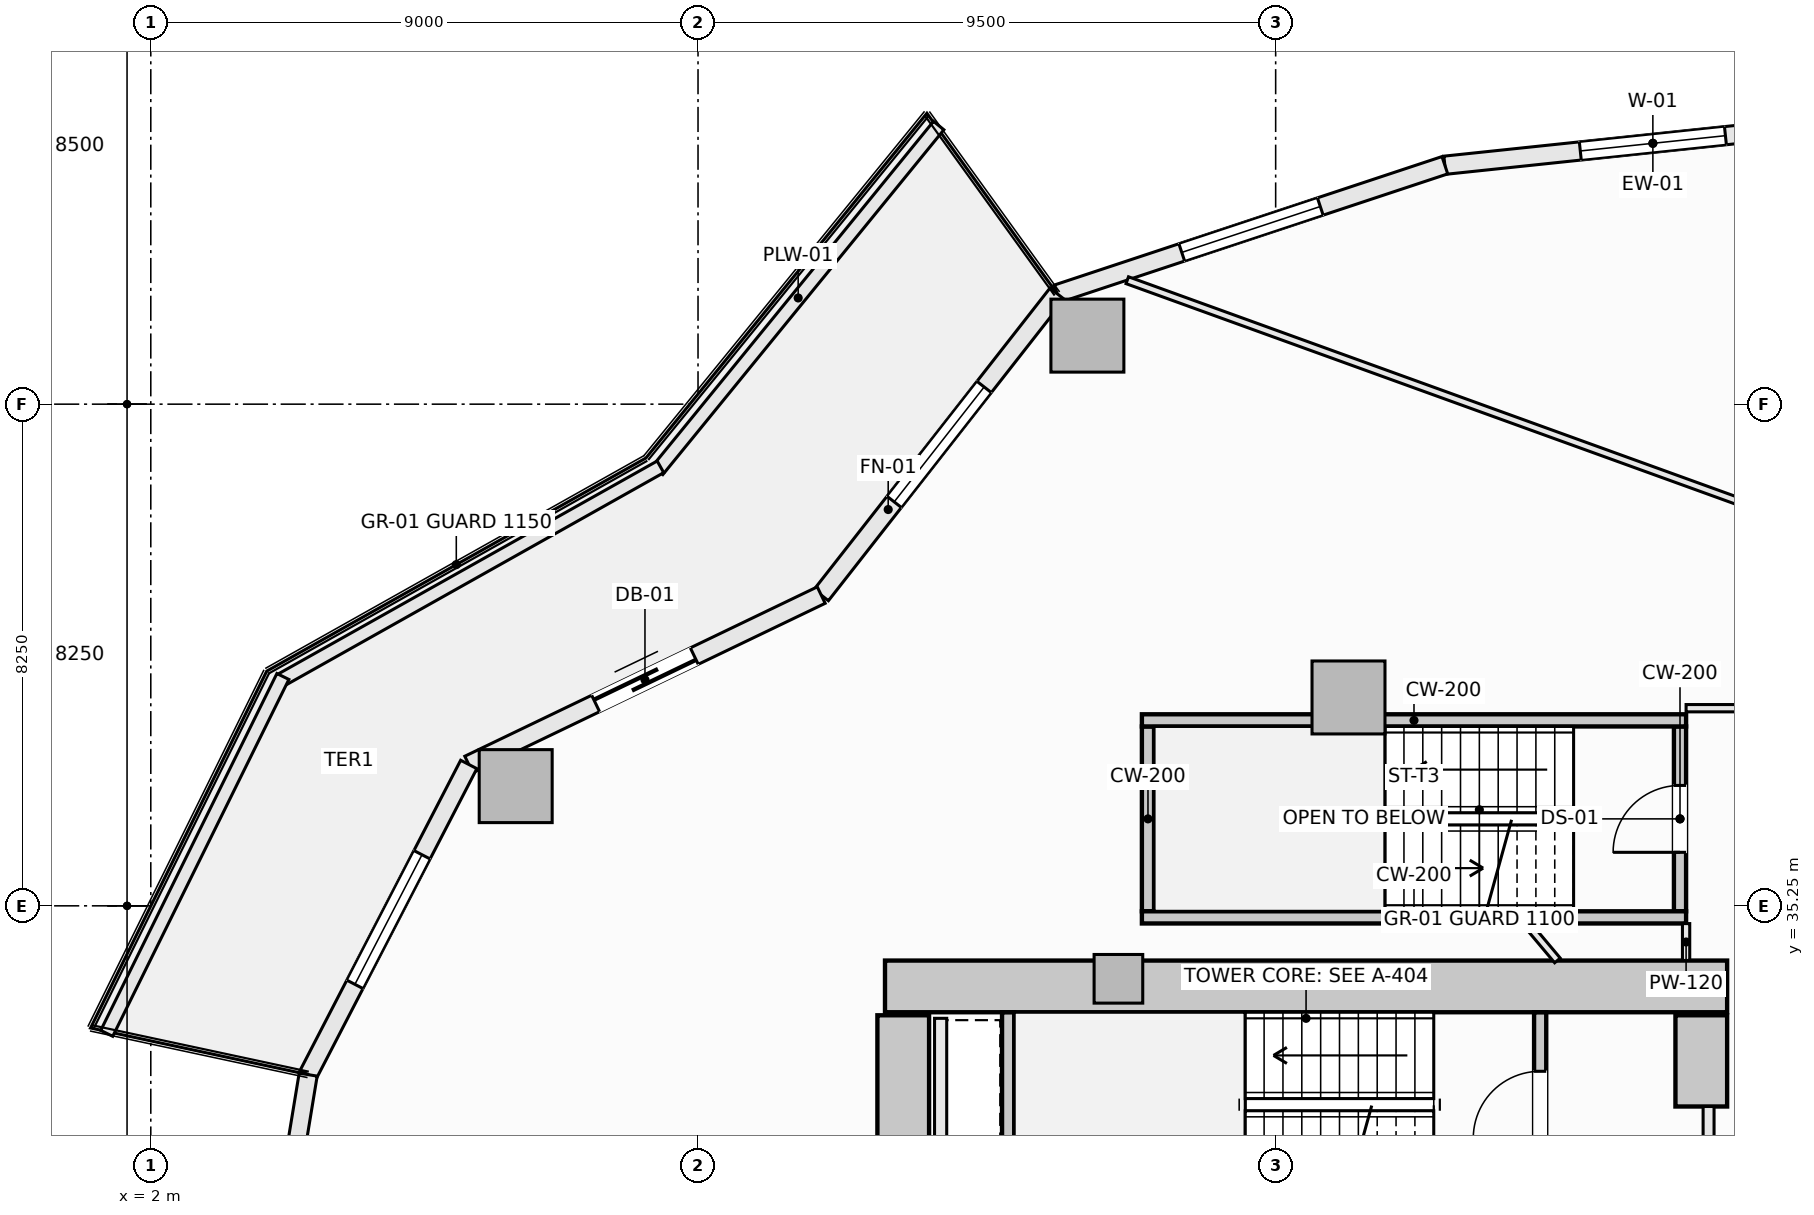
"""IFC4 building model, lengths in metres.
Left out: names, types, materials, properties, quantities, classifications, styles, units other than length and angle.
Written with IfcOpenShell. Run it as: python <this file> out.ifc"""

import sys

from ifc_helpers import new_model, si_unit, direction, frame, frame_2d, origin, origin_2d, place, context, subcontext, project, spatial, rectangle, extrude, element, fill, save


model = new_model("IFC4")
c1 = context("Model", 3, precision=1e-05, world=origin(), true_north=direction((0.0, 1.0)))
c2 = subcontext(c1, "Body", "Model", "MODEL_VIEW")
j1 = project(units=[si_unit("LENGTHUNIT", "METRE"), si_unit("PLANEANGLEUNIT", "RADIAN")], contexts=[c1])
p1 = place(None, origin())
s1 = spatial("IfcSite", under=j1, at=p1, CompositionType="ELEMENT")
p2 = place(p1, origin())
s2 = spatial("IfcBuilding", under=s1, at=p2, CompositionType="ELEMENT")
p3 = place(p2, frame((0.0, 0.0, 80.4)))
s3 = spatial("IfcBuildingStorey", under=s2, at=p3, CompositionType="ELEMENT", Elevation=80.4)
p4 = place(p3, frame((14.075, 33.925, -0.28), z_axis=(0.0, 0.0, 1.0), x_axis=(1.0, 0.0, 0.0)))
e1 = element("IfcWall", 1, at=p4, inside=s3, PredefinedType="SHEAR", context=c2, shape_type="SweptSolid", body=[
    extrude(rectangle(XDim=13.85, YDim=0.85, at=frame_2d((6.925, 0.0))), origin(), (0.0, 0.0, 1.0), 3.85),
])
p5 = place(p3, frame((14.375, 20.55, -0.28), z_axis=(0.0, 0.0, 1.0), x_axis=(0.0, 1.0, 0.0)))
e2 = element("IfcWall", 2, at=p5, inside=s3, PredefinedType="SHEAR", context=c2, shape_type="SweptSolid", body=[
    extrude(rectangle(XDim=12.9, YDim=0.85, at=frame_2d((6.45, 0.0))), origin(), (0.0, 0.0, 1.0), 3.85),
])
p6 = place(p3, frame((27.5, 31.95, -0.28), z_axis=(0.0, 0.0, 1.0), x_axis=(0.0, 1.0, 0.0)))
e3 = element("IfcWall", 3, at=p6, inside=s3, PredefinedType="SHEAR", context=c2, shape_type="SweptSolid", body=[
    extrude(rectangle(XDim=1.5, YDim=0.85, at=frame_2d((0.75, 0.0))), origin(), (0.0, 0.0, 1.0), 3.85),
])
for number, where, z_axis, x_axis in (
    (4, (17.404, 44.627, -0.28), (0.0, 0.0, 1.0), (1.0, 0.0, 0.0)),
    (5, (8.001, 37.219, -0.28), (0.0, 0.0, 1.0), (1.0, 0.0, 0.0)),
    (6, (21.698, 38.677, -0.28), (0.0, 0.0, 1.0), (1.0, 0.0, 0.0)),
):
    element("IfcColumn", number, at=place(p3, frame(where, z_axis=z_axis, x_axis=x_axis)), inside=s3, PredefinedType="COLUMN", context=c2, shape_type="SweptSolid", body=[
        extrude(rectangle(XDim=1.2, YDim=1.2, at=origin_2d()), origin(), (0.0, 0.0, 1.0), 3.85),
    ])
p7 = place(p3, frame((17.914, 34.05, -0.28), z_axis=(0.0, 0.0, 1.0), x_axis=(1.0, 0.0, 0.0)))
e7 = element("IfcColumn", 7, at=p7, inside=s3, PredefinedType="PILASTER", context=c2, shape_type="SweptSolid", body=[
    extrude(rectangle(XDim=0.8, YDim=0.8, at=origin_2d()), origin(), (0.0, 0.0, 1.0), 3.85),
])
p8 = place(p3, frame((23.282, 47.429, 0.0), z_axis=(0.0, 0.0, 1.0), x_axis=(0.994498840295, 0.104747585419, 0.0)))
e8 = element("IfcWall", 8, at=p8, inside=s3, PredefinedType="SOLIDWALL", context=c2, shape_type="SweptSolid", body=[
    extrude(rectangle(XDim=6.88, YDim=0.3, at=frame_2d((3.44, 0.0))), origin(), (0.0, 0.0, 1.0), 3.093),
])
p9 = place(p8, frame((2.24, 0.0, 0.85)))
e9 = element("IfcOpeningElement", 9, at=p9, cuts=e8, PredefinedType="OPENING", context=c2, shape_type="SweptSolid", body=[
    extrude(rectangle(XDim=2.4, YDim=1.9, at=frame_2d((1.2, 0.95))), frame((0.0, 0.16, 0.0), z_axis=(0.0, -1.0, 0.0), x_axis=(1.0, 0.0, 0.0)), (0.0, 0.0, 1.0), 0.32),
])
p10 = place(p3, frame((16.906, 45.316, 0.0), z_axis=(0.0, 0.0, 1.0), x_axis=(0.949245153629, 0.314537181127, 0.0)))
e10 = element("IfcWall", 10, at=p10, inside=s3, PredefinedType="SOLIDWALL", context=c2, shape_type="SweptSolid", body=[
    extrude(rectangle(XDim=6.717, YDim=0.3, at=frame_2d((3.358, 0.0))), origin(), (0.0, 0.0, 1.0), 3.093),
])
p11 = place(p10, frame((2.159, 0.0, 0.85)))
e11 = element("IfcOpeningElement", 11, at=p11, cuts=e10, PredefinedType="OPENING", context=c2, shape_type="SweptSolid", body=[
    extrude(rectangle(XDim=2.4, YDim=1.9, at=frame_2d((1.2, 0.95))), frame((0.0, 0.16, 0.0), z_axis=(0.0, -1.0, 0.0), x_axis=(1.0, 0.0, 0.0)), (0.0, 0.0, 1.0), 0.32),
])
p12 = place(p3, frame((13.026, 40.36, 0.0), z_axis=(0.0, 0.0, 1.0), x_axis=(0.616434798832, 0.78740595552, 0.0)))
e12 = element("IfcWall", 12, at=p12, inside=s3, PredefinedType="SOLIDWALL", context=c2, shape_type="SweptSolid", body=[
    extrude(rectangle(XDim=6.294, YDim=0.3, at=frame_2d((3.147, 0.0))), origin(), (0.0, 0.0, 1.0), 3.093),
])
p13 = place(p12, frame((1.947, 0.0, 0.85)))
e13 = element("IfcOpeningElement", 13, at=p13, cuts=e12, PredefinedType="OPENING", context=c2, shape_type="SweptSolid", body=[
    extrude(rectangle(XDim=2.4, YDim=1.9, at=frame_2d((1.2, 0.95))), frame((0.0, 0.16, 0.0), z_axis=(0.0, -1.0, 0.0), x_axis=(1.0, 0.0, 0.0)), (0.0, 0.0, 1.0), 0.32),
])
p14 = place(p3, frame((7.229, 37.575, 0.0), z_axis=(0.0, 0.0, 1.0), x_axis=(0.901354747727, 0.433081538224, 0.0)))
e14 = element("IfcWall", 14, at=p14, inside=s3, PredefinedType="SOLIDWALL", context=c2, shape_type="SweptSolid", body=[
    extrude(rectangle(XDim=6.431, YDim=0.3, at=frame_2d((3.215, 0.0))), origin(), (0.0, 0.0, 1.0), 3.093),
])
p15 = place(p14, frame((2.315, 0.0, 0.0)))
e15 = element("IfcOpeningElement", 15, at=p15, cuts=e14, PredefinedType="OPENING", context=c2, shape_type="SweptSolid", body=[
    extrude(rectangle(XDim=1.8, YDim=2.25, at=frame_2d((0.9, 1.125))), frame((0.0, 0.16, 0.0), z_axis=(0.0, -1.0, 0.0), x_axis=(1.0, 0.0, 0.0)), (0.0, 0.0, 1.0), 0.32),
])
p16 = place(p3, frame((4.588, 32.474, 0.0), z_axis=(0.0, 0.0, 1.0), x_axis=(0.459800981414, 0.888021991558, 0.0)))
e16 = element("IfcWall", 16, at=p16, inside=s3, PredefinedType="SOLIDWALL", context=c2, shape_type="SweptSolid", body=[
    extrude(rectangle(XDim=5.744, YDim=0.3, at=frame_2d((2.872, 0.0))), origin(), (0.0, 0.0, 1.0), 3.093),
])
p17 = place(p16, frame((1.672, 0.0, 0.85)))
e17 = element("IfcOpeningElement", 17, at=p17, cuts=e16, PredefinedType="OPENING", context=c2, shape_type="SweptSolid", body=[
    extrude(rectangle(XDim=2.4, YDim=1.9, at=frame_2d((1.2, 0.95))), frame((0.0, 0.16, 0.0), z_axis=(0.0, -1.0, 0.0), x_axis=(1.0, 0.0, 0.0)), (0.0, 0.0, 1.0), 0.32),
])
p18 = place(p3, frame((3.688, 27.0, 0.0), z_axis=(0.0, 0.0, 1.0), x_axis=(0.162386212206, 0.986727276447, 0.0)))
e18 = element("IfcWall", 18, at=p18, inside=s3, PredefinedType="SOLIDWALL", context=c2, shape_type="SweptSolid", body=[
    extrude(rectangle(XDim=5.548, YDim=0.3, at=frame_2d((2.774, 0.0))), origin(), (0.0, 0.0, 1.0), 3.093),
])
p19 = place(p18, frame((1.574, 0.0, 0.85)))
e19 = element("IfcOpeningElement", 19, at=p19, cuts=e18, PredefinedType="OPENING", context=c2, shape_type="SweptSolid", body=[
    extrude(rectangle(XDim=2.4, YDim=1.9, at=frame_2d((1.2, 0.95))), frame((0.0, 0.16, 0.0), z_axis=(0.0, -1.0, 0.0), x_axis=(1.0, 0.0, 0.0)), (0.0, 0.0, 1.0), 0.32),
])
p20 = place(p3, frame((10.336, 42.411, 0.0), z_axis=(0.0, 0.0, 1.0), x_axis=(0.631819273026, 0.775115737315, 0.0)))
e20 = element("IfcWall", 20, at=p20, inside=s3, PredefinedType="PARAPET", context=c2, shape_type="SweptSolid", body=[
    extrude(rectangle(XDim=7.316, YDim=0.22, at=frame_2d((3.658, 0.0))), origin(), (0.0, 0.0, 1.0), 0.52),
])
p21 = place(p3, frame((4.147, 38.966, 0.0), z_axis=(0.0, 0.0, 1.0), x_axis=(0.871775109335, 0.489906275468, 0.0)))
e21 = element("IfcWall", 21, at=p21, inside=s3, PredefinedType="PARAPET", context=c2, shape_type="SweptSolid", body=[
    extrude(rectangle(XDim=7.152, YDim=0.22, at=frame_2d((3.576, 0.0))), origin(), (0.0, 0.0, 1.0), 0.52),
])
p22 = place(p3, frame((1.275, 33.153, 0.0), z_axis=(0.0, 0.0, 1.0), x_axis=(0.442686636348, 0.89667638644, 0.0)))
e22 = element("IfcWall", 22, at=p22, inside=s3, PredefinedType="PARAPET", context=c2, shape_type="SweptSolid", body=[
    extrude(rectangle(XDim=6.545, YDim=0.22, at=frame_2d((3.272, 0.0))), origin(), (0.0, 0.0, 1.0), 0.52),
])
p23 = place(p3, frame((24.85, 30.46, -0.28), z_axis=(0.0, 0.0, 1.0), x_axis=(0.0, 1.0, 0.0)))
e23 = element("IfcWall", 23, at=p23, inside=s3, PredefinedType="SHEAR", context=c2, shape_type="SweptSolid", body=[
    extrude(rectangle(XDim=3.038, YDim=0.2, at=frame_2d((1.519, 0.0))), origin(), (0.0, 0.0, 1.0), 3.85),
])
p24 = place(p23, frame((0.969, 0.0, 0.28)))
e24 = element("IfcOpeningElement", 24, at=p24, cuts=e23, PredefinedType="OPENING", context=c2, shape_type="SweptSolid", body=[
    extrude(rectangle(XDim=1.1, YDim=2.15, at=frame_2d((0.55, 1.075))), frame((0.0, 0.11, 0.0), z_axis=(0.0, -1.0, 0.0), x_axis=(1.0, 0.0, 0.0)), (0.0, 0.0, 1.0), 0.22),
])
p25 = place(p3, frame((16.1, 30.462, -0.28), z_axis=(0.0, 0.0, 1.0), x_axis=(0.0, 1.0, 0.0)))
e25 = element("IfcWall", 25, at=p25, inside=s3, PredefinedType="SHEAR", context=c2, shape_type="SweptSolid", body=[
    extrude(rectangle(XDim=3.036, YDim=0.2, at=frame_2d((1.518, 0.0))), origin(), (0.0, 0.0, 1.0), 3.85),
])
p26 = place(p3, frame((27.15, 35.16, -0.28), z_axis=(0.0, 0.0, 1.0), x_axis=(0.0, 1.0, 0.0)))
e26 = element("IfcWall", 26, at=p26, inside=s3, PredefinedType="SHEAR", context=c2, shape_type="SweptSolid", body=[
    extrude(rectangle(XDim=3.04, YDim=0.2, at=frame_2d((1.52, 0.0))), origin(), (0.0, 0.0, 1.0), 3.85),
])
p27 = place(p26, frame((0.97, 0.0, 0.28)))
e27 = element("IfcOpeningElement", 27, at=p27, cuts=e26, PredefinedType="OPENING", context=c2, shape_type="SweptSolid", body=[
    extrude(rectangle(XDim=1.1, YDim=2.15, at=frame_2d((0.55, 1.075))), frame((0.0, 0.11, 0.0), z_axis=(0.0, -1.0, 0.0), x_axis=(1.0, 0.0, 0.0)), (0.0, 0.0, 1.0), 0.22),
])
p28 = place(p3, frame((18.4, 35.16, -0.28), z_axis=(0.0, 0.0, 1.0), x_axis=(0.0, 1.0, 0.0)))
e28 = element("IfcWall", 28, at=p28, inside=s3, PredefinedType="SHEAR", context=c2, shape_type="SweptSolid", body=[
    extrude(rectangle(XDim=3.04, YDim=0.2, at=frame_2d((1.52, 0.0))), origin(), (0.0, 0.0, 1.0), 3.85),
])
for number, where, z_axis, x_axis in (
    (29, (18.3, 38.3, -0.28), (0.0, 0.0, 1.0), (1.0, 0.0, 0.0)),
    (30, (18.3, 35.06, -0.28), (0.0, 0.0, 1.0), (1.0, 0.0, 0.0)),
):
    element("IfcWall", number, at=place(p3, frame(where, z_axis=z_axis, x_axis=x_axis)), inside=s3, PredefinedType="SHEAR", context=c2, shape_type="SweptSolid", body=[
        extrude(rectangle(XDim=8.95, YDim=0.2, at=frame_2d((4.475, 0.0))), origin(), (0.0, 0.0, 1.0), 3.85),
    ])
p29 = place(p3, frame((14.99, 30.55, 0.0), z_axis=(0.0, 0.0, 1.0), x_axis=(0.0, 1.0, 0.0)))
e31 = element("IfcWall", 31, at=p29, inside=s3, PredefinedType="SOLIDWALL", context=c2, shape_type="SweptSolid", body=[
    extrude(rectangle(XDim=2.85, YDim=0.2, at=frame_2d((1.425, 0.0))), origin(), (0.0, 0.0, 1.0), 3.57),
])
p30 = place(p3, frame((27.62, 22.05, 0.0), z_axis=(0.0, 0.0, 1.0), x_axis=(0.0, 1.0, 0.0)))
e32 = element("IfcWall", 32, at=p30, inside=s3, PredefinedType="SOLIDWALL", context=c2, shape_type="SweptSolid", body=[
    extrude(rectangle(XDim=9.9, YDim=0.18, at=frame_2d((4.95, 0.0))), origin(), (0.0, 0.0, 1.0), 2.662),
])
p31 = place(p30, frame((4.475, 0.0, 0.0)))
e33 = element("IfcOpeningElement", 33, at=p31, cuts=e32, PredefinedType="OPENING", context=c2, shape_type="SweptSolid", body=[
    extrude(rectangle(XDim=0.95, YDim=2.1, at=frame_2d((0.475, 1.05))), frame((0.0, 0.1, 0.0), z_axis=(0.0, -1.0, 0.0), x_axis=(1.0, 0.0, 0.0)), (0.0, 0.0, 1.0), 0.2),
])
p32 = place(p30, frame((6.89, 0.0, 0.0)))
e34 = element("IfcOpeningElement", 34, at=p32, cuts=e32, PredefinedType="OPENING", context=c2, shape_type="SweptSolid", body=[
    extrude(rectangle(XDim=1.5, YDim=2.2, at=frame_2d((0.75, 1.1))), frame((0.0, 0.1, 0.0), z_axis=(0.0, -1.0, 0.0), x_axis=(1.0, 0.0, 0.0)), (0.0, 0.0, 1.0), 0.2),
])
p33 = place(p30, frame((1.51, 0.0, 0.0)))
e35 = element("IfcOpeningElement", 35, at=p33, cuts=e32, PredefinedType="OPENING", context=c2, shape_type="SweptSolid", body=[
    extrude(rectangle(XDim=1.5, YDim=2.2, at=frame_2d((0.75, 1.1))), frame((0.0, 0.1, 0.0), z_axis=(0.0, -1.0, 0.0), x_axis=(1.0, 0.0, 0.0)), (0.0, 0.0, 1.0), 0.2),
])
p34 = place(p3, frame((27.25, 34.352, 0.0), z_axis=(0.0, 0.0, 1.0), x_axis=(0.0, 1.0, 0.0)))
e36 = element("IfcWall", 36, at=p34, inside=s3, PredefinedType="PARTITIONING", context=c2, shape_type="SweptSolid", body=[
    extrude(rectangle(XDim=0.606, YDim=0.12, at=frame_2d((0.303, 0.0))), origin(), (0.0, 0.0, 1.0), 3.57),
])
p35 = place(p3, frame((27.25, 38.5, 0.0), z_axis=(0.0, 0.0, 1.0), x_axis=(1.0, 0.0, 0.0)))
e37 = element("IfcWall", 37, at=p35, inside=s3, PredefinedType="PARTITIONING", context=c2, shape_type="SweptSolid", body=[
    extrude(rectangle(XDim=2.53, YDim=0.12, at=frame_2d((1.265, 0.0))), origin(), (0.0, 0.0, 1.0), 3.57),
])
p36 = place(p3, frame((18.06, 45.538, 0.0), z_axis=(0.0, 0.0, 1.0), x_axis=(0.940354559933, -0.340195975304, 0.0)))
e38 = element("IfcWall", 38, at=p36, inside=s3, PredefinedType="PARTITIONING", context=c2, shape_type="SweptSolid", body=[
    extrude(rectangle(XDim=28.53, YDim=0.12, at=frame_2d((14.265, 0.0))), origin(), (0.0, 0.0, 1.0), 3.093),
])
p37 = place(p3, frame((24.626, 34.958, 0.0), z_axis=(0.0, 0.0, 1.0), x_axis=(0.643032873298, -0.765838575588, 0.0)))
e39 = element("IfcWall", 39, at=p37, inside=s3, PredefinedType="PARTITIONING", context=c2, shape_type="SweptSolid", body=[
    extrude(rectangle(XDim=0.791, YDim=0.12, at=frame_2d((0.396, 0.0))), origin(), (0.0, 0.0, 1.0), 3.57),
])
p38 = place(p9, origin())
e40 = element("IfcWindow", 40, at=p38, inside=s3, PartitioningType="SINGLE_PANEL", PredefinedType="WINDOW", context=c2, shape_type="SweptSolid", body=[
    extrude(rectangle(XDim=2.4, YDim=1.9, at=frame_2d((1.2, 0.95))), frame((0.0, 0.03, 0.0), z_axis=(0.0, -1.0, 0.0), x_axis=(1.0, 0.0, 0.0)), (0.0, 0.0, 1.0), 0.06),
])
fill(e9, e40)
p39 = place(p11, origin())
e41 = element("IfcWindow", 41, at=p39, inside=s3, PartitioningType="SINGLE_PANEL", PredefinedType="WINDOW", context=c2, shape_type="SweptSolid", body=[
    extrude(rectangle(XDim=2.4, YDim=1.9, at=frame_2d((1.2, 0.95))), frame((0.0, 0.03, 0.0), z_axis=(0.0, -1.0, 0.0), x_axis=(1.0, 0.0, 0.0)), (0.0, 0.0, 1.0), 0.06),
])
fill(e11, e41)
p40 = place(p13, origin())
e42 = element("IfcWindow", 42, at=p40, inside=s3, PartitioningType="SINGLE_PANEL", PredefinedType="WINDOW", context=c2, shape_type="SweptSolid", body=[
    extrude(rectangle(XDim=2.4, YDim=1.9, at=frame_2d((1.2, 0.95))), frame((0.0, 0.03, 0.0), z_axis=(0.0, -1.0, 0.0), x_axis=(1.0, 0.0, 0.0)), (0.0, 0.0, 1.0), 0.06),
])
fill(e13, e42)
p41 = place(p15, origin())
e43 = element("IfcDoor", 43, at=p41, inside=s3, OperationType="SLIDING_TO_LEFT", PredefinedType="DOOR", context=c2, shape_type="SweptSolid", body=[
    extrude(rectangle(XDim=1.8, YDim=2.25, at=frame_2d((0.9, 1.125))), frame((0.0, 0.025, 0.0), z_axis=(0.0, -1.0, 0.0), x_axis=(1.0, 0.0, 0.0)), (0.0, 0.0, 1.0), 0.05),
])
fill(e15, e43)
p42 = place(p17, origin())
e44 = element("IfcWindow", 44, at=p42, inside=s3, PartitioningType="SINGLE_PANEL", PredefinedType="WINDOW", context=c2, shape_type="SweptSolid", body=[
    extrude(rectangle(XDim=2.4, YDim=1.9, at=frame_2d((1.2, 0.95))), frame((0.0, 0.03, 0.0), z_axis=(0.0, -1.0, 0.0), x_axis=(1.0, 0.0, 0.0)), (0.0, 0.0, 1.0), 0.06),
])
fill(e17, e44)
p43 = place(p24, origin())
e45 = element("IfcDoor", 45, at=p43, inside=s3, OperationType="SINGLE_SWING_LEFT", PredefinedType="DOOR", context=c2, shape_type="SweptSolid", body=[
    extrude(rectangle(XDim=1.1, YDim=2.15, at=frame_2d((0.55, 1.075))), frame((0.0, 0.025, 0.0), z_axis=(0.0, -1.0, 0.0), x_axis=(1.0, 0.0, 0.0)), (0.0, 0.0, 1.0), 0.05),
])
fill(e24, e45)
p44 = place(p27, origin())
e46 = element("IfcDoor", 46, at=p44, inside=s3, OperationType="SINGLE_SWING_LEFT", PredefinedType="DOOR", context=c2, shape_type="SweptSolid", body=[
    extrude(rectangle(XDim=1.1, YDim=2.15, at=frame_2d((0.55, 1.075))), frame((0.0, 0.025, 0.0), z_axis=(0.0, -1.0, 0.0), x_axis=(1.0, 0.0, 0.0)), (0.0, 0.0, 1.0), 0.05),
])
fill(e27, e46)
save(model, sys.argv[1])
